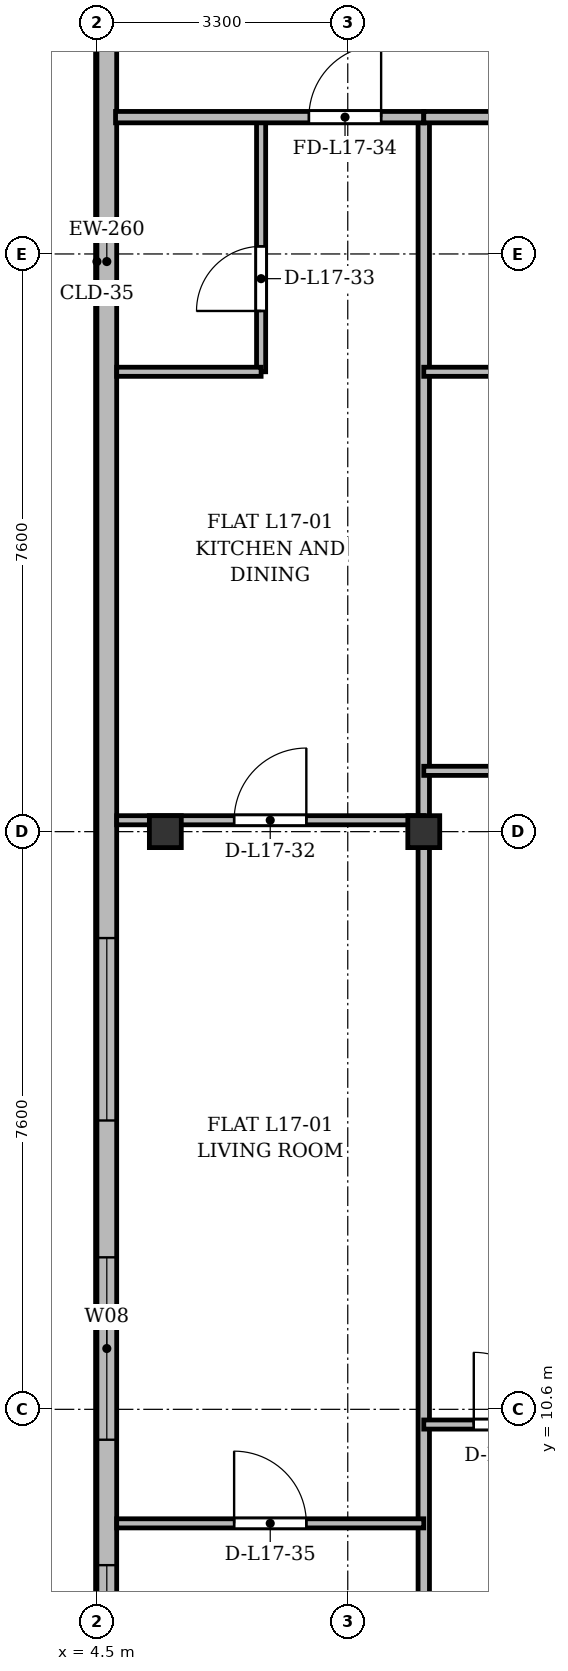
"""IFC4 building model, lengths in metres.
Left out: names, types, materials, properties, quantities, classifications, styles, units other than length and angle.
Written with IfcOpenShell. Run it as: python <this file> out.ifc"""

import sys

from ifc_helpers import new_model, si_unit, direction, frame, frame_2d, origin, origin_2d, place, context, subcontext, project, spatial, rectangle, i_section, extrude, source, transform, mapped, element, fill, save


model = new_model("IFC4")
c1 = context("Model", 3, precision=1e-05, world=origin(), true_north=direction((0.0, 1.0)))
c2 = subcontext(c1, "Body", "Model", "MODEL_VIEW")
j1 = project(units=[si_unit("LENGTHUNIT", "METRE"), si_unit("PLANEANGLEUNIT", "RADIAN")], contexts=[c1])
p1 = place(None, origin())
s1 = spatial("IfcSite", under=j1, at=p1, CompositionType="ELEMENT")
p2 = place(p1, origin())
s2 = spatial("IfcBuilding", under=s1, at=p2, CompositionType="ELEMENT")
p3 = place(p2, frame((0.0, 0.0, 66.7)))
s3 = spatial("IfcBuildingStorey", under=s2, at=p3, CompositionType="ELEMENT", Elevation=66.7)
m1 = source(origin(), c2, "Body", "SweptSolid", [
    extrude(i_section(OverallWidth=0.42, OverallDepth=0.42, WebThickness=0.026, FlangeThickness=0.04, at=origin_2d()), origin(), (0.0, 0.0, 1.0), 3.6),
])
for number, where, z_axis, x_axis in (
    (1, (5.4, 18.2, 0.0), (0.0, 0.0, 1.0), (1.0, 0.0, 0.0)),
    (2, (8.8, 18.2, 0.0), (0.0, 0.0, 1.0), (1.0, 0.0, 0.0)),
):
    element("IfcColumn", number, at=place(p3, frame(where, z_axis=z_axis, x_axis=x_axis)), inside=s3, PredefinedType="COLUMN", context=c2, shape_type="MappedRepresentation", body=[
        mapped(m1, transform((0.0, 0.0, 0.0), x_axis=(1.0, 0.0, 0.0), y_axis=(0.0, 1.0, 0.0), z_axis=(0.0, 0.0, 1.0), scale=1.0)),
    ])
p4 = place(p3, frame((4.63, 5.9, 0.0), z_axis=(0.0, 0.0, 1.0), x_axis=(0.0, 1.0, 0.0)))
e3 = element("IfcWall", 3, at=p4, inside=s3, PredefinedType="SOLIDWALL", context=c2, shape_type="SweptSolid", body=[
    extrude(rectangle(XDim=39.6, YDim=0.26, at=frame_2d((19.8, 0.0))), origin(), (0.0, 0.0, 1.0), 3.34),
])
p5 = place(p4, frame((1.45, 0.0, 0.92)))
e4 = element("IfcOpeningElement", 4, at=p5, cuts=e3, PredefinedType="OPENING", context=c2, shape_type="SweptSolid", body=[
    extrude(rectangle(XDim=1.2, YDim=1.65, at=frame_2d((0.6, 0.825))), frame((0.0, 0.14, 0.0), z_axis=(0.0, -1.0, 0.0), x_axis=(1.0, 0.0, 0.0)), (0.0, 0.0, 1.0), 0.28),
])
p6 = place(p4, frame((4.3, 0.0, 0.92)))
e5 = element("IfcOpeningElement", 5, at=p6, cuts=e3, PredefinedType="OPENING", context=c2, shape_type="SweptSolid", body=[
    extrude(rectangle(XDim=2.4, YDim=2.1, at=frame_2d((1.2, 1.05))), frame((0.0, 0.14, 0.0), z_axis=(0.0, -1.0, 0.0), x_axis=(1.0, 0.0, 0.0)), (0.0, 0.0, 1.0), 0.28),
])
p7 = place(p4, frame((8.5, 0.0, 0.92)))
e6 = element("IfcOpeningElement", 6, at=p7, cuts=e3, PredefinedType="OPENING", context=c2, shape_type="SweptSolid", body=[
    extrude(rectangle(XDim=2.4, YDim=2.1, at=frame_2d((1.2, 1.05))), frame((0.0, 0.14, 0.0), z_axis=(0.0, -1.0, 0.0), x_axis=(1.0, 0.0, 0.0)), (0.0, 0.0, 1.0), 0.28),
])
p8 = place(p4, frame((33.9, 0.0, 0.92)))
e7 = element("IfcOpeningElement", 7, at=p8, cuts=e3, PredefinedType="OPENING", context=c2, shape_type="SweptSolid", body=[
    extrude(rectangle(XDim=1.2, YDim=1.65, at=frame_2d((0.6, 0.825))), frame((0.0, 0.14, 0.0), z_axis=(0.0, -1.0, 0.0), x_axis=(1.0, 0.0, 0.0)), (0.0, 0.0, 1.0), 0.28),
])
p9 = place(p4, frame((37.25, 0.0, 0.92)))
e8 = element("IfcOpeningElement", 8, at=p9, cuts=e3, PredefinedType="OPENING", context=c2, shape_type="SweptSolid", body=[
    extrude(rectangle(XDim=1.2, YDim=1.65, at=frame_2d((0.6, 0.825))), frame((0.0, 0.14, 0.0), z_axis=(0.0, -1.0, 0.0), x_axis=(1.0, 0.0, 0.0)), (0.0, 0.0, 1.0), 0.28),
])
p10 = place(p3, frame((8.8, 3.145, 0.0), z_axis=(0.0, 0.0, 1.0), x_axis=(0.0, 1.0, 0.0)))
e9 = element("IfcWall", 9, at=p10, inside=s3, PredefinedType="PARTITIONING", context=c2, shape_type="SweptSolid", body=[
    extrude(rectangle(XDim=24.455, YDim=0.15, at=frame_2d((12.228, 0.0))), origin(), (0.0, 0.0, 1.0), 2.752),
])
p11 = place(p3, frame((4.76, 18.35, 0.0), z_axis=(0.0, 0.0, 1.0), x_axis=(1.0, 0.0, 0.0)))
e10 = element("IfcWall", 10, at=p11, inside=s3, PredefinedType="PARTITIONING", context=c2, shape_type="SweptSolid", body=[
    extrude(rectangle(XDim=4.04, YDim=0.12, at=frame_2d((2.02, 0.0))), origin(), (0.0, 0.0, 1.0), 2.69),
])
p12 = place(p11, frame((1.545, 0.0, 0.0)))
e11 = element("IfcOpeningElement", 11, at=p12, cuts=e10, PredefinedType="OPENING", context=c2, shape_type="SweptSolid", body=[
    extrude(rectangle(XDim=0.95, YDim=2.15, at=frame_2d((0.475, 1.075))), frame((0.0, 0.07, 0.0), z_axis=(0.0, -1.0, 0.0), x_axis=(1.0, 0.0, 0.0)), (0.0, 0.0, 1.0), 0.14),
])
p13 = place(p3, frame((6.66, 24.25, 0.0), z_axis=(0.0, 0.0, 1.0), x_axis=(0.0, 1.0, 0.0)))
e12 = element("IfcWall", 12, at=p13, inside=s3, PredefinedType="PARTITIONING", context=c2, shape_type="SweptSolid", body=[
    extrude(rectangle(XDim=3.35, YDim=0.12, at=frame_2d((1.675, 0.0))), origin(), (0.0, 0.0, 1.0), 2.94),
])
p14 = place(p13, frame((0.8, 0.0, 0.0)))
e13 = element("IfcOpeningElement", 13, at=p14, cuts=e12, PredefinedType="OPENING", context=c2, shape_type="SweptSolid", body=[
    extrude(rectangle(XDim=0.85, YDim=2.1, at=frame_2d((0.425, 1.05))), frame((0.0, 0.07, 0.0), z_axis=(0.0, -1.0, 0.0), x_axis=(1.0, 0.0, 0.0)), (0.0, 0.0, 1.0), 0.14),
])
p15 = place(p3, frame((4.76, 24.25, 0.0), z_axis=(0.0, 0.0, 1.0), x_axis=(1.0, 0.0, 0.0)))
e14 = element("IfcWall", 14, at=p15, inside=s3, PredefinedType="PARTITIONING", context=c2, shape_type="SweptSolid", body=[
    extrude(rectangle(XDim=1.9, YDim=0.12, at=frame_2d((0.95, 0.0))), origin(), (0.0, 0.0, 1.0), 2.752),
])
p16 = place(p3, frame((4.745, 27.6, 0.0), z_axis=(0.0, 0.0, 1.0), x_axis=(1.0, 0.0, 0.0)))
e15 = element("IfcWall", 15, at=p16, inside=s3, PredefinedType="PARTITIONING", context=c2, shape_type="SweptSolid", body=[
    extrude(rectangle(XDim=4.055, YDim=0.15, at=frame_2d((2.027, 0.0))), origin(), (0.0, 0.0, 1.0), 2.752),
])
p17 = place(p16, frame((2.544, 0.0, 0.0)))
e16 = element("IfcOpeningElement", 16, at=p17, cuts=e15, PredefinedType="OPENING", context=c2, shape_type="SweptSolid", body=[
    extrude(rectangle(XDim=0.95, YDim=2.15, at=frame_2d((0.475, 1.075))), frame((0.0, 0.085, 0.0), z_axis=(0.0, -1.0, 0.0), x_axis=(1.0, 0.0, 0.0)), (0.0, 0.0, 1.0), 0.17),
])
p18 = place(p3, frame((4.76, 9.1, 0.0), z_axis=(0.0, 0.0, 1.0), x_axis=(1.0, 0.0, 0.0)))
e17 = element("IfcWall", 17, at=p18, inside=s3, PredefinedType="PARTITIONING", context=c2, shape_type="SweptSolid", body=[
    extrude(rectangle(XDim=4.04, YDim=0.12, at=frame_2d((2.02, 0.0))), origin(), (0.0, 0.0, 1.0), 2.752),
])
p19 = place(p18, frame((1.545, 0.0, 0.0)))
e18 = element("IfcOpeningElement", 18, at=p19, cuts=e17, PredefinedType="OPENING", context=c2, shape_type="SweptSolid", body=[
    extrude(rectangle(XDim=0.95, YDim=2.15, at=frame_2d((0.475, 1.075))), frame((0.0, 0.07, 0.0), z_axis=(0.0, -1.0, 0.0), x_axis=(1.0, 0.0, 0.0)), (0.0, 0.0, 1.0), 0.14),
])
p20 = place(p3, frame((8.8, 19.0, 0.0), z_axis=(0.0, 0.0, 1.0), x_axis=(1.0, 0.0, 0.0)))
e19 = element("IfcWall", 19, at=p20, inside=s3, PredefinedType="PARTITIONING", context=c2, shape_type="SweptSolid", body=[
    extrude(rectangle(XDim=6.8, YDim=0.12, at=frame_2d((3.4, 0.0))), origin(), (0.0, 0.0, 1.0), 2.752),
])
p21 = place(p20, frame((2.925, 0.0, 0.0)))
e20 = element("IfcOpeningElement", 20, at=p21, cuts=e19, PredefinedType="OPENING", context=c2, shape_type="SweptSolid", body=[
    extrude(rectangle(XDim=0.95, YDim=2.15, at=frame_2d((0.475, 1.075))), frame((0.0, 0.07, 0.0), z_axis=(0.0, -1.0, 0.0), x_axis=(1.0, 0.0, 0.0)), (0.0, 0.0, 1.0), 0.14),
])
p22 = place(p3, frame((8.8, 24.25, 0.0), z_axis=(0.0, 0.0, 1.0), x_axis=(1.0, 0.0, 0.0)))
e21 = element("IfcWall", 21, at=p22, inside=s3, PredefinedType="PARTITIONING", context=c2, shape_type="SweptSolid", body=[
    extrude(rectangle(XDim=2.362, YDim=0.12, at=frame_2d((1.181, 0.0))), origin(), (0.0, 0.0, 1.0), 2.752),
])
p23 = place(p3, frame((8.8, 27.6, 0.0), z_axis=(0.0, 0.0, 1.0), x_axis=(1.0, 0.0, 0.0)))
e22 = element("IfcWall", 22, at=p23, inside=s3, PredefinedType="PARTITIONING", context=c2, shape_type="SweptSolid", body=[
    extrude(rectangle(XDim=6.8, YDim=0.15, at=frame_2d((3.4, 0.0))), origin(), (0.0, 0.0, 1.0), 2.752),
])
p24 = place(p23, frame((4.49, 0.0, 0.0)))
e23 = element("IfcOpeningElement", 23, at=p24, cuts=e22, PredefinedType="OPENING", context=c2, shape_type="SweptSolid", body=[
    extrude(rectangle(XDim=0.95, YDim=2.15, at=frame_2d((0.475, 1.075))), frame((0.0, 0.085, 0.0), z_axis=(0.0, -1.0, 0.0), x_axis=(1.0, 0.0, 0.0)), (0.0, 0.0, 1.0), 0.17),
])
p25 = place(p3, frame((8.8, 10.4, 0.0), z_axis=(0.0, 0.0, 1.0), x_axis=(1.0, 0.0, 0.0)))
e24 = element("IfcWall", 24, at=p25, inside=s3, PredefinedType="PARTITIONING", context=c2, shape_type="SweptSolid", body=[
    extrude(rectangle(XDim=2.267, YDim=0.12, at=frame_2d((1.133, 0.0))), origin(), (0.0, 0.0, 1.0), 2.752),
])
p26 = place(p25, frame((0.658, 0.0, 0.0)))
e25 = element("IfcOpeningElement", 25, at=p26, cuts=e24, PredefinedType="OPENING", context=c2, shape_type="SweptSolid", body=[
    extrude(rectangle(XDim=0.95, YDim=2.15, at=frame_2d((0.475, 1.075))), frame((0.0, 0.07, 0.0), z_axis=(0.0, -1.0, 0.0), x_axis=(1.0, 0.0, 0.0)), (0.0, 0.0, 1.0), 0.14),
])
m2 = source(origin(), c2, "Body", "SweptSolid", [
    extrude(rectangle(XDim=1.2, YDim=1.65, at=frame_2d((0.6, 0.825))), frame((0.0, 0.03, 0.0), z_axis=(0.0, -1.0, 0.0), x_axis=(1.0, 0.0, 0.0)), (0.0, 0.0, 1.0), 0.06),
])
p27 = place(p5, origin())
e26 = element("IfcWindow", 26, at=p27, inside=s3, PartitioningType="SINGLE_PANEL", PredefinedType="WINDOW", context=c2, shape_type="MappedRepresentation", body=[
    mapped(m2, transform((0.0, 0.0, 0.0), x_axis=(1.0, 0.0, 0.0), y_axis=(0.0, 1.0, 0.0), z_axis=(0.0, 0.0, 1.0), scale=1.0)),
])
fill(e4, e26)
m3 = source(origin(), c2, "Body", "SweptSolid", [
    extrude(rectangle(XDim=2.4, YDim=2.1, at=frame_2d((1.2, 1.05))), frame((0.0, 0.03, 0.0), z_axis=(0.0, -1.0, 0.0), x_axis=(1.0, 0.0, 0.0)), (0.0, 0.0, 1.0), 0.06),
])
p28 = place(p6, origin())
e27 = element("IfcWindow", 27, at=p28, inside=s3, PartitioningType="SINGLE_PANEL", PredefinedType="WINDOW", context=c2, shape_type="MappedRepresentation", body=[
    mapped(m3, transform((0.0, 0.0, 0.0), x_axis=(1.0, 0.0, 0.0), y_axis=(0.0, 1.0, 0.0), z_axis=(0.0, 0.0, 1.0), scale=1.0)),
])
fill(e5, e27)
p29 = place(p7, origin())
e28 = element("IfcWindow", 28, at=p29, inside=s3, PartitioningType="SINGLE_PANEL", PredefinedType="WINDOW", context=c2, shape_type="MappedRepresentation", body=[
    mapped(m3, transform((0.0, 0.0, 0.0), x_axis=(1.0, 0.0, 0.0), y_axis=(0.0, 1.0, 0.0), z_axis=(0.0, 0.0, 1.0), scale=1.0)),
])
fill(e6, e28)
m4 = source(origin(), c2, "Body", "SweptSolid", [
    extrude(rectangle(XDim=0.95, YDim=2.15, at=frame_2d((0.475, 1.075))), frame((0.0, 0.025, 0.0), z_axis=(0.0, -1.0, 0.0), x_axis=(1.0, 0.0, 0.0)), (0.0, 0.0, 1.0), 0.05),
])
p30 = place(p12, origin())
e29 = element("IfcDoor", 29, at=p30, inside=s3, OperationType="SINGLE_SWING_RIGHT", PredefinedType="DOOR", context=c2, shape_type="MappedRepresentation", body=[
    mapped(m4, transform((0.0, 0.0, 0.0), x_axis=(1.0, 0.0, 0.0), y_axis=(0.0, 1.0, 0.0), z_axis=(0.0, 0.0, 1.0), scale=1.0)),
])
fill(e11, e29)
m5 = source(origin(), c2, "Body", "SweptSolid", [
    extrude(rectangle(XDim=0.85, YDim=2.1, at=frame_2d((0.425, 1.05))), frame((0.0, 0.025, 0.0), z_axis=(0.0, -1.0, 0.0), x_axis=(1.0, 0.0, 0.0)), (0.0, 0.0, 1.0), 0.05),
])
p31 = place(p14, origin())
e30 = element("IfcDoor", 30, at=p31, inside=s3, OperationType="SINGLE_SWING_LEFT", PredefinedType="DOOR", context=c2, shape_type="MappedRepresentation", body=[
    mapped(m5, transform((0.0, 0.0, 0.0), x_axis=(1.0, 0.0, 0.0), y_axis=(0.0, 1.0, 0.0), z_axis=(0.0, 0.0, 1.0), scale=1.0)),
])
fill(e13, e30)
p32 = place(p17, origin())
e31 = element("IfcDoor", 31, at=p32, inside=s3, OperationType="SINGLE_SWING_RIGHT", PredefinedType="DOOR", context=c2, shape_type="MappedRepresentation", body=[
    mapped(m4, transform((0.0, 0.0, 0.0), x_axis=(1.0, 0.0, 0.0), y_axis=(0.0, 1.0, 0.0), z_axis=(0.0, 0.0, 1.0), scale=1.0)),
])
fill(e16, e31)
p33 = place(p19, origin())
e32 = element("IfcDoor", 32, at=p33, inside=s3, OperationType="SINGLE_SWING_LEFT", PredefinedType="DOOR", context=c2, shape_type="MappedRepresentation", body=[
    mapped(m4, transform((0.0, 0.0, 0.0), x_axis=(1.0, 0.0, 0.0), y_axis=(0.0, 1.0, 0.0), z_axis=(0.0, 0.0, 1.0), scale=1.0)),
])
fill(e18, e32)
p34 = place(p26, origin())
e33 = element("IfcDoor", 33, at=p34, inside=s3, OperationType="SINGLE_SWING_LEFT", PredefinedType="DOOR", context=c2, shape_type="MappedRepresentation", body=[
    mapped(m4, transform((0.0, 0.0, 0.0), x_axis=(1.0, 0.0, 0.0), y_axis=(0.0, 1.0, 0.0), z_axis=(0.0, 0.0, 1.0), scale=1.0)),
])
fill(e25, e33)
save(model, sys.argv[1])
